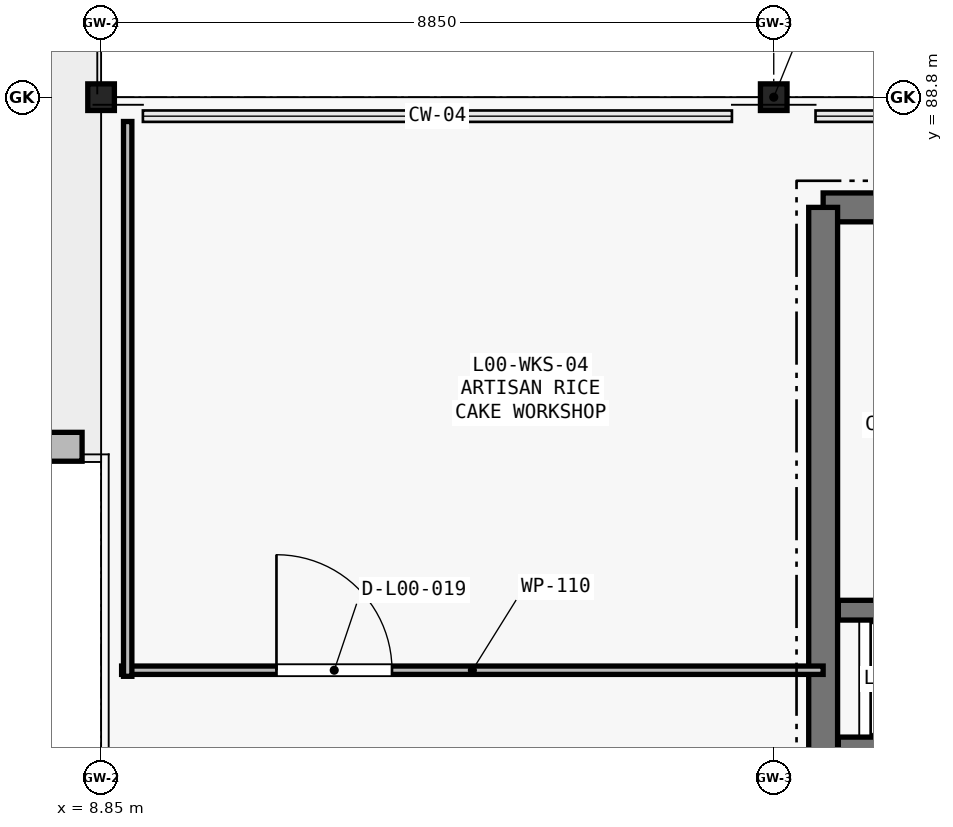
"""IFC4 building model, lengths in metres.
Left out: names, types, materials, properties, quantities, classifications, styles, units other than length and angle.
Written with IfcOpenShell. Run it as: python <this file> out.ifc"""

import sys

from ifc_helpers import new_model, si_unit, direction, frame, frame_2d, origin, origin_2d, place, context, subcontext, project, spatial, rectangle, hollow_rectangle, i_section, extrude, element, fill, save


model = new_model("IFC4")
c1 = context("Model", 3, precision=1e-05, world=origin(), true_north=direction((0.0, 1.0)))
c2 = subcontext(c1, "Body", "Model", "MODEL_VIEW")
j1 = project(units=[si_unit("LENGTHUNIT", "METRE"), si_unit("PLANEANGLEUNIT", "RADIAN")], contexts=[c1])
p1 = place(None, origin())
s1 = spatial("IfcSite", under=j1, at=p1, CompositionType="ELEMENT")
p2 = place(p1, origin())
s2 = spatial("IfcBuilding", under=s1, at=p2, CompositionType="ELEMENT")
p3 = place(p2, origin())
s3 = spatial("IfcBuildingStorey", under=s2, at=p3, CompositionType="ELEMENT", Elevation=0.0)
p4 = place(p3, frame((8.85, 88.8, 0.0), z_axis=(0.0, 0.0, 1.0), x_axis=(1.0, 0.0, 0.0)))
e1 = element("IfcColumn", 1, at=p4, inside=s3, PredefinedType="COLUMN", context=c2, shape_type="SweptSolid", body=[
    extrude(hollow_rectangle(XDim=0.35, YDim=0.35, WallThickness=0.012, InnerFilletRadius=0.012, OuterFilletRadius=0.016, at=origin_2d()), origin(), (0.0, 0.0, 1.0), 6.0),
])
p5 = place(p3, frame((17.7, 88.8, 0.0), z_axis=(0.0, 0.0, 1.0), x_axis=(1.0, 0.0, 0.0)))
e2 = element("IfcColumn", 2, at=p5, inside=s3, PredefinedType="COLUMN", context=c2, shape_type="SweptSolid", body=[
    extrude(i_section(OverallWidth=0.35, OverallDepth=0.35, WebThickness=0.012, FlangeThickness=0.019, FilletRadius=0.02, at=origin_2d()), origin(), (0.0, 0.0, 1.0), 6.0),
])
p6 = place(p3, frame((0.2, 84.2, 0.0), z_axis=(0.0, 0.0, 1.0), x_axis=(1.0, 0.0, 0.0)))
e3 = element("IfcWall", 3, at=p6, inside=s3, PredefinedType="SOLIDWALL", context=c2, shape_type="SweptSolid", body=[
    extrude(rectangle(XDim=8.4, YDim=0.38, at=frame_2d((4.2, 0.0))), origin(), (0.0, 0.0, 1.0), 4.8),
])
p7 = place(p6, frame((0.4, 0.0, 0.0)))
e4 = element("IfcOpeningElement", 4, at=p7, cuts=e3, PredefinedType="OPENING", context=c2, shape_type="SweptSolid", body=[
    extrude(rectangle(XDim=6.6, YDim=3.2, at=frame_2d((3.3, 1.6))), frame((0.0, 0.2, 0.0), z_axis=(0.0, -1.0, 0.0), x_axis=(1.0, 0.0, 0.0)), (0.0, 0.0, 1.0), 0.4),
])
p8 = place(p3, frame((25.9, 87.35, 0.0), z_axis=(0.0, 0.0, 1.0), x_axis=(-1.0, 0.0, 0.0)))
e5 = element("IfcWall", 5, at=p8, inside=s3, PredefinedType="SHEAR", context=c2, shape_type="SweptSolid", body=[
    extrude(rectangle(XDim=7.55, YDim=0.38, at=frame_2d((3.775, 0.0))), origin(), (0.0, 0.0, 1.0), 6.0),
])
p9 = place(p3, frame((18.35, 87.35, 0.0), z_axis=(0.0, 0.0, 1.0), x_axis=(0.0, -1.0, 0.0)))
e6 = element("IfcWall", 6, at=p9, inside=s3, PredefinedType="SHEAR", context=c2, shape_type="SweptSolid", body=[
    extrude(rectangle(XDim=8.8, YDim=0.38, at=frame_2d((4.4, 0.0))), origin(), (0.0, 0.0, 1.0), 6.0),
])
for number, where, z_axis, x_axis in (
    (7, (18.55, 80.25, 0.0), (0.0, 0.0, 1.0), (1.0, 0.0, 0.0)),
    (8, (18.55, 82.05, 0.0), (0.0, 0.0, 1.0), (1.0, 0.0, 0.0)),
):
    element("IfcWall", number, at=place(p3, frame(where, z_axis=z_axis, x_axis=x_axis)), inside=s3, PredefinedType="SHEAR", context=c2, shape_type="SweptSolid", body=[
        extrude(rectangle(XDim=2.355, YDim=0.26, at=frame_2d((1.177, 0.0))), origin(), (0.0, 0.0, 1.0), 6.0),
    ])
p10 = place(p3, frame((9.12, 81.26, 0.0), z_axis=(0.0, 0.0, 1.0), x_axis=(1.0, 0.0, 0.0)))
e9 = element("IfcWall", 9, at=p10, inside=s3, PredefinedType="PARTITIONING", context=c2, shape_type="SweptSolid", body=[
    extrude(rectangle(XDim=9.23, YDim=0.11, at=frame_2d((4.615, 0.0))), origin(), (0.0, 0.0, 1.0), 5.52),
])
p11 = place(p10, frame((2.038, 0.0, 0.0)))
e10 = element("IfcOpeningElement", 10, at=p11, cuts=e9, PredefinedType="OPENING", context=c2, shape_type="SweptSolid", body=[
    extrude(rectangle(XDim=1.52, YDim=2.15, at=frame_2d((0.76, 1.075))), frame((0.0, 0.065, 0.0), z_axis=(0.0, -1.0, 0.0), x_axis=(1.0, 0.0, 0.0)), (0.0, 0.0, 1.0), 0.13),
])
p12 = place(p3, frame((9.2, 88.48, 0.0), z_axis=(0.0, 0.0, 1.0), x_axis=(0.0, -1.0, 0.0)))
e11 = element("IfcWall", 11, at=p12, inside=s3, PredefinedType="PARTITIONING", context=c2, shape_type="SweptSolid", body=[
    extrude(rectangle(XDim=7.3, YDim=0.11, at=frame_2d((3.65, 0.0))), origin(), (0.0, 0.0, 1.0), 5.52),
])
p13 = place(p11, origin())
e12 = element("IfcDoor", 12, at=p13, inside=s3, OperationType="SINGLE_SWING_LEFT", PredefinedType="DOOR", context=c2, shape_type="SweptSolid", body=[
    extrude(rectangle(XDim=1.52, YDim=2.15, at=frame_2d((0.76, 1.075))), frame((0.0, 0.025, 0.0), z_axis=(0.0, -1.0, 0.0), x_axis=(1.0, 0.0, 0.0)), (0.0, 0.0, 1.0), 0.05),
])
fill(e10, e12)
save(model, sys.argv[1])
